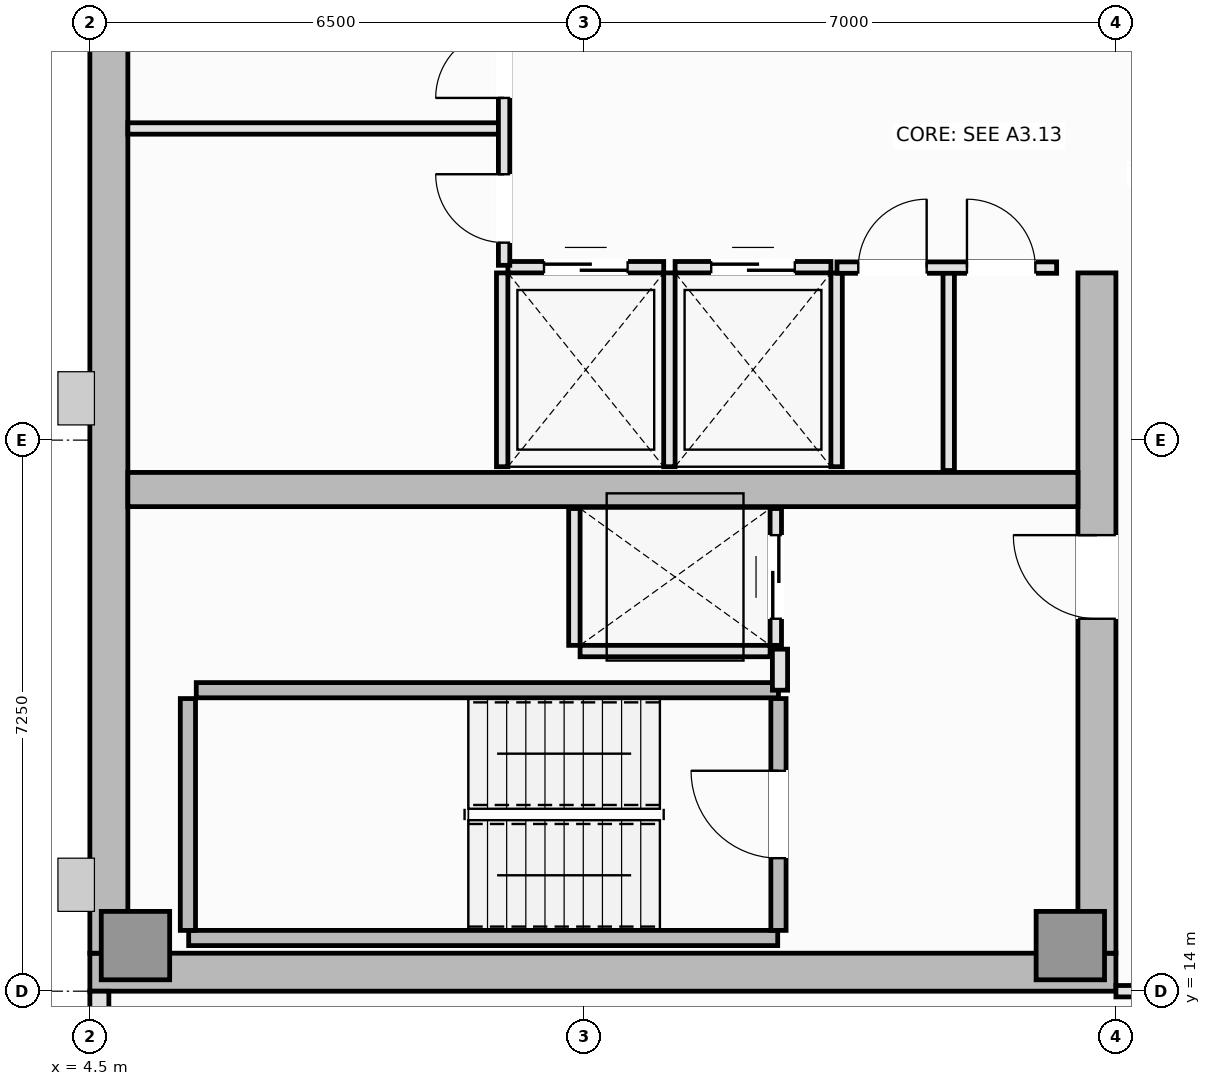
"""IFC4 building model, lengths in metres.
Left out: names, types, materials, properties, quantities, classifications, styles, units other than length and angle.
Written with IfcOpenShell. Run it as: python <this file> out.ifc"""

import sys

from ifc_helpers import new_model, si_unit, direction, frame, frame_2d, origin, origin_2d, place, context, subcontext, project, spatial, rectangle, extrude, element, fill, save


model = new_model("IFC4")
c1 = context("Model", 3, precision=1e-05, world=origin(), true_north=direction((0.0, 1.0)))
c2 = subcontext(c1, "Body", "Model", "MODEL_VIEW")
j1 = project(units=[si_unit("LENGTHUNIT", "METRE"), si_unit("PLANEANGLEUNIT", "RADIAN")], contexts=[c1])
p1 = place(None, origin())
s1 = spatial("IfcSite", under=j1, at=p1, CompositionType="ELEMENT")
p2 = place(p1, origin())
s2 = spatial("IfcBuilding", under=s1, at=p2, CompositionType="ELEMENT")
p3 = place(p2, frame((0.0, 0.0, 249.25)))
s3 = spatial("IfcBuildingStorey", under=s2, at=p3, CompositionType="ELEMENT", Elevation=249.25)
p4 = place(p3, frame((4.5, 14.25, 0.0), z_axis=(0.0, 0.0, 1.0), x_axis=(1.0, 0.0, 0.0)))
e1 = element("IfcWall", 1, at=p4, inside=s3, PredefinedType="SHEAR", context=c2, shape_type="SweptSolid", body=[
    extrude(rectangle(XDim=13.5, YDim=0.5, at=frame_2d((6.75, 0.0))), origin(), (0.0, 0.0, 1.0), 3.55),
])
p5 = place(p3, frame((4.75, 14.5, 0.0), z_axis=(0.0, 0.0, 1.0), x_axis=(0.0, 1.0, 0.0)))
e2 = element("IfcWall", 2, at=p5, inside=s3, PredefinedType="SHEAR", context=c2, shape_type="SweptSolid", body=[
    extrude(rectangle(XDim=21.5, YDim=0.5, at=frame_2d((10.75, 0.0))), origin(), (0.0, 0.0, 1.0), 3.55),
])
p6 = place(p3, frame((17.75, 14.5, 0.0), z_axis=(0.0, 0.0, 1.0), x_axis=(0.0, 1.0, 0.0)))
e3 = element("IfcWall", 3, at=p6, inside=s3, PredefinedType="SHEAR", context=c2, shape_type="SweptSolid", body=[
    extrude(rectangle(XDim=8.95, YDim=0.5, at=frame_2d((4.475, 0.0))), origin(), (0.0, 0.0, 1.0), 3.55),
])
p7 = place(p6, frame((4.4, 0.0, 0.0)))
e4 = element("IfcOpeningElement", 4, at=p7, cuts=e3, PredefinedType="OPENING", context=c2, shape_type="SweptSolid", body=[
    extrude(rectangle(XDim=1.1, YDim=2.15, at=frame_2d((0.55, 1.075))), frame((0.0, 0.26, 0.0), z_axis=(0.0, -1.0, 0.0), x_axis=(1.0, 0.0, 0.0)), (0.0, 0.0, 1.0), 0.52),
])
p8 = place(p3, frame((5.0, 20.6, 0.0), z_axis=(0.0, 0.0, 1.0), x_axis=(1.0, 0.0, 0.0)))
e5 = element("IfcWall", 5, at=p8, inside=s3, PredefinedType="SHEAR", context=c2, shape_type="SweptSolid", body=[
    extrude(rectangle(XDim=12.5, YDim=0.45, at=frame_2d((6.25, 0.0))), origin(), (0.0, 0.0, 1.0), 3.55),
])
for number, where, z_axis, x_axis in (
    (6, (5.1, 14.6, 0.0), (0.0, 0.0, 1.0), (1.0, 0.0, 0.0)),
    (7, (17.4, 14.6, 0.0), (0.0, 0.0, 1.0), (1.0, 0.0, 0.0)),
):
    element("IfcColumn", number, at=place(p3, frame(where, z_axis=z_axis, x_axis=x_axis)), inside=s3, PredefinedType="PILASTER", context=c2, shape_type="SweptSolid", body=[
        extrude(rectangle(XDim=0.9, YDim=0.9, at=origin_2d()), origin(), (0.0, 0.0, 1.0), 3.55),
    ])
p9 = place(p3, frame((4.625, 14.0, 0.0), z_axis=(0.0, 0.0, 1.0), x_axis=(0.0, -1.0, 0.0)))
e8 = element("IfcWall", 8, at=p9, inside=s3, PredefinedType="SOLIDWALL", context=c2, shape_type="SweptSolid", body=[
    extrude(rectangle(XDim=3.4, YDim=0.25, at=frame_2d((1.7, 0.0))), origin(), (0.0, 0.0, 1.0), 3.39),
])
p10 = place(p9, frame((0.6, 0.0, 0.9)))
e9 = element("IfcOpeningElement", 9, at=p10, cuts=e8, PredefinedType="OPENING", context=c2, shape_type="SweptSolid", body=[
    extrude(rectangle(XDim=2.2, YDim=1.8, at=frame_2d((1.1, 0.9))), frame((0.0, 0.135, 0.0), z_axis=(0.0, -1.0, 0.0), x_axis=(1.0, 0.0, 0.0)), (0.0, 0.0, 1.0), 0.27),
])
p11 = place(p3, frame((5.8, 14.7, 0.0), z_axis=(0.0, 0.0, 1.0), x_axis=(1.0, 0.0, 0.0)))
e10 = element("IfcWall", 10, at=p11, inside=s3, PredefinedType="SOLIDWALL", context=c2, shape_type="SweptSolid", body=[
    extrude(rectangle(XDim=7.75, YDim=0.2, at=frame_2d((3.875, 0.0))), origin(), (0.0, 0.0, 1.0), 3.55),
])
p12 = place(p3, frame((5.79, 14.8, 0.0), z_axis=(0.0, 0.0, 1.0), x_axis=(0.0, 1.0, 0.0)))
e11 = element("IfcWall", 11, at=p12, inside=s3, PredefinedType="SOLIDWALL", context=c2, shape_type="SweptSolid", body=[
    extrude(rectangle(XDim=3.05, YDim=0.2, at=frame_2d((1.525, 0.0))), origin(), (0.0, 0.0, 1.0), 3.55),
])
p13 = place(p3, frame((5.9, 17.96, 0.0), z_axis=(0.0, 0.0, 1.0), x_axis=(1.0, 0.0, 0.0)))
e12 = element("IfcWall", 12, at=p13, inside=s3, PredefinedType="SOLIDWALL", context=c2, shape_type="SweptSolid", body=[
    extrude(rectangle(XDim=7.66, YDim=0.2, at=frame_2d((3.83, 0.0))), origin(), (0.0, 0.0, 1.0), 3.55),
])
p14 = place(p3, frame((13.56, 14.8, 0.0), z_axis=(0.0, 0.0, 1.0), x_axis=(0.0, 1.0, 0.0)))
e13 = element("IfcWall", 13, at=p14, inside=s3, PredefinedType="SOLIDWALL", context=c2, shape_type="SweptSolid", body=[
    extrude(rectangle(XDim=3.05, YDim=0.2, at=frame_2d((1.525, 0.0))), origin(), (0.0, 0.0, 1.0), 3.55),
])
p15 = place(p14, frame((0.95, 0.0, 0.0)))
e14 = element("IfcOpeningElement", 14, at=p15, cuts=e13, PredefinedType="OPENING", context=c2, shape_type="SweptSolid", body=[
    extrude(rectangle(XDim=1.15, YDim=2.15, at=frame_2d((0.575, 1.075))), frame((0.0, 0.11, 0.0), z_axis=(0.0, -1.0, 0.0), x_axis=(1.0, 0.0, 0.0)), (0.0, 0.0, 1.0), 0.22),
])
p16 = place(p3, frame((10.0, 23.525, 0.0), z_axis=(0.0, 0.0, 1.0), x_axis=(1.0, 0.0, 0.0)))
e15 = element("IfcWall", 15, at=p16, inside=s3, PredefinedType="PARTITIONING", context=c2, shape_type="SweptSolid", body=[
    extrude(rectangle(XDim=2.05, YDim=0.15, at=frame_2d((1.025, 0.0))), origin(), (0.0, 0.0, 1.0), 3.39),
])
p17 = place(p16, frame((0.475, 0.0, 0.0)))
e16 = element("IfcOpeningElement", 16, at=p17, cuts=e15, PredefinedType="OPENING", context=c2, shape_type="SweptSolid", body=[
    extrude(rectangle(XDim=1.1, YDim=2.2, at=frame_2d((0.55, 1.1))), frame((0.0, 0.085, 0.0), z_axis=(0.0, -1.0, 0.0), x_axis=(1.0, 0.0, 0.0)), (0.0, 0.0, 1.0), 0.17),
])
for number, where, z_axis, x_axis in (
    (17, (9.925, 20.9, 0.0), (0.0, 0.0, 1.0), (0.0, 1.0, 0.0)),
    (18, (12.125, 20.9, 0.0), (0.0, 0.0, 1.0), (0.0, 1.0, 0.0)),
):
    element("IfcWall", number, at=place(p3, frame(where, z_axis=z_axis, x_axis=x_axis)), inside=s3, PredefinedType="PARTITIONING", context=c2, shape_type="SweptSolid", body=[
        extrude(rectangle(XDim=2.55, YDim=0.15, at=frame_2d((1.275, 0.0))), origin(), (0.0, 0.0, 1.0), 3.39),
    ])
p18 = place(p3, frame((12.2, 23.525, 0.0), z_axis=(0.0, 0.0, 1.0), x_axis=(1.0, 0.0, 0.0)))
e19 = element("IfcWall", 19, at=p18, inside=s3, PredefinedType="PARTITIONING", context=c2, shape_type="SweptSolid", body=[
    extrude(rectangle(XDim=2.05, YDim=0.15, at=frame_2d((1.025, 0.0))), origin(), (0.0, 0.0, 1.0), 3.39),
])
p19 = place(p18, frame((0.475, 0.0, 0.0)))
e20 = element("IfcOpeningElement", 20, at=p19, cuts=e19, PredefinedType="OPENING", context=c2, shape_type="SweptSolid", body=[
    extrude(rectangle(XDim=1.1, YDim=2.2, at=frame_2d((0.55, 1.1))), frame((0.0, 0.085, 0.0), z_axis=(0.0, -1.0, 0.0), x_axis=(1.0, 0.0, 0.0)), (0.0, 0.0, 1.0), 0.17),
])
p20 = place(p3, frame((14.325, 20.9, 0.0), z_axis=(0.0, 0.0, 1.0), x_axis=(0.0, 1.0, 0.0)))
e21 = element("IfcWall", 21, at=p20, inside=s3, PredefinedType="PARTITIONING", context=c2, shape_type="SweptSolid", body=[
    extrude(rectangle(XDim=2.55, YDim=0.15, at=frame_2d((1.275, 0.0))), origin(), (0.0, 0.0, 1.0), 3.39),
])
p21 = place(p3, frame((10.95, 18.475, 0.0), z_axis=(0.0, 0.0, 1.0), x_axis=(1.0, 0.0, 0.0)))
e22 = element("IfcWall", 22, at=p21, inside=s3, PredefinedType="PARTITIONING", context=c2, shape_type="SweptSolid", body=[
    extrude(rectangle(XDim=2.5, YDim=0.15, at=frame_2d((1.25, 0.0))), origin(), (0.0, 0.0, 1.0), 3.39),
])
p22 = place(p3, frame((10.875, 18.55, 0.0), z_axis=(0.0, 0.0, 1.0), x_axis=(0.0, 1.0, 0.0)))
e23 = element("IfcWall", 23, at=p22, inside=s3, PredefinedType="PARTITIONING", context=c2, shape_type="SweptSolid", body=[
    extrude(rectangle(XDim=1.8, YDim=0.15, at=frame_2d((0.9, 0.0))), origin(), (0.0, 0.0, 1.0), 3.39),
])
p23 = place(p3, frame((13.525, 18.55, 0.0), z_axis=(0.0, 0.0, 1.0), x_axis=(0.0, 1.0, 0.0)))
e24 = element("IfcWall", 24, at=p23, inside=s3, PredefinedType="PARTITIONING", context=c2, shape_type="SweptSolid", body=[
    extrude(rectangle(XDim=1.8, YDim=0.15, at=frame_2d((0.9, 0.0))), origin(), (0.0, 0.0, 1.0), 3.39),
])
p24 = place(p23, frame((0.35, 0.0, 0.0)))
e25 = element("IfcOpeningElement", 25, at=p24, cuts=e24, PredefinedType="OPENING", context=c2, shape_type="SweptSolid", body=[
    extrude(rectangle(XDim=1.1, YDim=2.2, at=frame_2d((0.55, 1.1))), frame((0.0, 0.085, 0.0), z_axis=(0.0, -1.0, 0.0), x_axis=(1.0, 0.0, 0.0)), (0.0, 0.0, 1.0), 0.17),
])
p25 = place(p3, frame((13.58, 17.96, 0.0), z_axis=(0.0, 0.0, 1.0), x_axis=(0.0, 1.0, 0.0)))
e26 = element("IfcWall", 26, at=p25, inside=s3, PredefinedType="PARTITIONING", context=c2, shape_type="SweptSolid", body=[
    extrude(rectangle(XDim=0.54, YDim=0.2, at=frame_2d((0.27, 0.0))), origin(), (0.0, 0.0, 1.0), 3.39),
])
p26 = place(p3, frame((5.0, 25.35, 0.0), z_axis=(0.0, 0.0, 1.0), x_axis=(1.0, 0.0, 0.0)))
e27 = element("IfcWall", 27, at=p26, inside=s3, PredefinedType="PARTITIONING", context=c2, shape_type="SweptSolid", body=[
    extrude(rectangle(XDim=4.95, YDim=0.15, at=frame_2d((2.475, 0.0))), origin(), (0.0, 0.0, 1.0), 3.39),
])
p27 = place(p3, frame((9.95, 23.55, 0.0), z_axis=(0.0, 0.0, 1.0), x_axis=(0.0, 1.0, 0.0)))
e28 = element("IfcWall", 28, at=p27, inside=s3, PredefinedType="PARTITIONING", context=c2, shape_type="SweptSolid", body=[
    extrude(rectangle(XDim=3.4, YDim=0.15, at=frame_2d((1.7, 0.0))), origin(), (0.0, 0.0, 1.0), 3.39),
])
p28 = place(p27, frame((0.298, 0.0, 0.0)))
e29 = element("IfcOpeningElement", 29, at=p28, cuts=e28, PredefinedType="OPENING", context=c2, shape_type="SweptSolid", body=[
    extrude(rectangle(XDim=0.9, YDim=2.1, at=frame_2d((0.45, 1.05))), frame((0.0, 0.085, 0.0), z_axis=(0.0, -1.0, 0.0), x_axis=(1.0, 0.0, 0.0)), (0.0, 0.0, 1.0), 0.17),
])
p29 = place(p27, frame((2.202, 0.0, 0.0)))
e30 = element("IfcOpeningElement", 30, at=p29, cuts=e28, PredefinedType="OPENING", context=c2, shape_type="SweptSolid", body=[
    extrude(rectangle(XDim=0.9, YDim=2.1, at=frame_2d((0.45, 1.05))), frame((0.0, 0.085, 0.0), z_axis=(0.0, -1.0, 0.0), x_axis=(1.0, 0.0, 0.0)), (0.0, 0.0, 1.0), 0.17),
])
p30 = place(p3, frame((15.8, 20.85, 0.0), z_axis=(0.0, 0.0, 1.0), x_axis=(0.0, 1.0, 0.0)))
e31 = element("IfcWall", 31, at=p30, inside=s3, PredefinedType="PARTITIONING", context=c2, shape_type="SweptSolid", body=[
    extrude(rectangle(XDim=2.67, YDim=0.15, at=frame_2d((1.335, 0.0))), origin(), (0.0, 0.0, 1.0), 3.39),
])
p31 = place(p3, frame((14.33, 23.52, 0.0), z_axis=(0.0, 0.0, 1.0), x_axis=(1.0, 0.0, 0.0)))
e32 = element("IfcWall", 32, at=p31, inside=s3, PredefinedType="PARTITIONING", context=c2, shape_type="SweptSolid", body=[
    extrude(rectangle(XDim=2.89, YDim=0.15, at=frame_2d((1.445, 0.0))), origin(), (0.0, 0.0, 1.0), 3.39),
])
p32 = place(p31, frame((0.28, 0.0, 0.0)))
e33 = element("IfcOpeningElement", 33, at=p32, cuts=e32, PredefinedType="OPENING", context=c2, shape_type="SweptSolid", body=[
    extrude(rectangle(XDim=0.9, YDim=2.1, at=frame_2d((0.45, 1.05))), frame((0.0, 0.085, 0.0), z_axis=(0.0, -1.0, 0.0), x_axis=(1.0, 0.0, 0.0)), (0.0, 0.0, 1.0), 0.17),
])
p33 = place(p31, frame((1.71, 0.0, 0.0)))
e34 = element("IfcOpeningElement", 34, at=p33, cuts=e32, PredefinedType="OPENING", context=c2, shape_type="SweptSolid", body=[
    extrude(rectangle(XDim=0.9, YDim=2.1, at=frame_2d((0.45, 1.05))), frame((0.0, 0.085, 0.0), z_axis=(0.0, -1.0, 0.0), x_axis=(1.0, 0.0, 0.0)), (0.0, 0.0, 1.0), 0.17),
])
p34 = place(p3, frame((18.0, 14.0, 0.0), z_axis=(0.0, 0.0, 1.0), x_axis=(1.0, 0.0, 0.0)))
e35 = element("IfcWall", 35, at=p34, inside=s3, PredefinedType="PARTITIONING", context=c2, shape_type="SweptSolid", body=[
    extrude(rectangle(XDim=1.9, YDim=0.15, at=frame_2d((0.95, 0.0))), origin(), (0.0, 0.0, 1.0), 3.39),
])
p35 = place(p34, frame((0.5, 0.0, 0.0)))
e36 = element("IfcOpeningElement", 36, at=p35, cuts=e35, PredefinedType="OPENING", context=c2, shape_type="SweptSolid", body=[
    extrude(rectangle(XDim=0.9, YDim=2.1, at=frame_2d((0.45, 1.05))), frame((0.0, 0.085, 0.0), z_axis=(0.0, -1.0, 0.0), x_axis=(1.0, 0.0, 0.0)), (0.0, 0.0, 1.0), 0.17),
])
p36 = place(p15, origin())
e37 = element("IfcDoor", 37, at=p36, inside=s3, OperationType="SINGLE_SWING_RIGHT", PredefinedType="DOOR", context=c2, shape_type="SweptSolid", body=[
    extrude(rectangle(XDim=1.15, YDim=2.15, at=frame_2d((0.575, 1.075))), frame((0.0, 0.025, 0.0), z_axis=(0.0, -1.0, 0.0), x_axis=(1.0, 0.0, 0.0)), (0.0, 0.0, 1.0), 0.05),
])
fill(e14, e37)
p37 = place(p17, origin())
e38 = element("IfcDoor", 38, at=p37, inside=s3, OperationType="DOUBLE_DOOR_SLIDING", PredefinedType="DOOR", context=c2, shape_type="SweptSolid", body=[
    extrude(rectangle(XDim=1.1, YDim=2.2, at=frame_2d((0.55, 1.1))), frame((0.0, 0.025, 0.0), z_axis=(0.0, -1.0, 0.0), x_axis=(1.0, 0.0, 0.0)), (0.0, 0.0, 1.0), 0.05),
])
fill(e16, e38)
p38 = place(p19, origin())
e39 = element("IfcDoor", 39, at=p38, inside=s3, OperationType="DOUBLE_DOOR_SLIDING", PredefinedType="DOOR", context=c2, shape_type="SweptSolid", body=[
    extrude(rectangle(XDim=1.1, YDim=2.2, at=frame_2d((0.55, 1.1))), frame((0.0, 0.025, 0.0), z_axis=(0.0, -1.0, 0.0), x_axis=(1.0, 0.0, 0.0)), (0.0, 0.0, 1.0), 0.05),
])
fill(e20, e39)
p39 = place(p24, origin())
e40 = element("IfcDoor", 40, at=p39, inside=s3, OperationType="DOUBLE_DOOR_SLIDING", PredefinedType="DOOR", context=c2, shape_type="SweptSolid", body=[
    extrude(rectangle(XDim=1.1, YDim=2.2, at=frame_2d((0.55, 1.1))), frame((0.0, 0.025, 0.0), z_axis=(0.0, -1.0, 0.0), x_axis=(1.0, 0.0, 0.0)), (0.0, 0.0, 1.0), 0.05),
])
fill(e25, e40)
p40 = place(p7, origin())
e41 = element("IfcDoor", 41, at=p40, inside=s3, OperationType="SINGLE_SWING_RIGHT", PredefinedType="DOOR", context=c2, shape_type="SweptSolid", body=[
    extrude(rectangle(XDim=1.1, YDim=2.15, at=frame_2d((0.55, 1.075))), frame((0.0, 0.025, 0.0), z_axis=(0.0, -1.0, 0.0), x_axis=(1.0, 0.0, 0.0)), (0.0, 0.0, 1.0), 0.05),
])
fill(e4, e41)
p41 = place(p28, origin())
e42 = element("IfcDoor", 42, at=p41, inside=s3, OperationType="SINGLE_SWING_RIGHT", PredefinedType="DOOR", context=c2, shape_type="SweptSolid", body=[
    extrude(rectangle(XDim=0.9, YDim=2.1, at=frame_2d((0.45, 1.05))), frame((0.0, 0.025, 0.0), z_axis=(0.0, -1.0, 0.0), x_axis=(1.0, 0.0, 0.0)), (0.0, 0.0, 1.0), 0.05),
])
fill(e29, e42)
p42 = place(p29, origin())
e43 = element("IfcDoor", 43, at=p42, inside=s3, OperationType="SINGLE_SWING_LEFT", PredefinedType="DOOR", context=c2, shape_type="SweptSolid", body=[
    extrude(rectangle(XDim=0.9, YDim=2.1, at=frame_2d((0.45, 1.05))), frame((0.0, 0.025, 0.0), z_axis=(0.0, -1.0, 0.0), x_axis=(1.0, 0.0, 0.0)), (0.0, 0.0, 1.0), 0.05),
])
fill(e30, e43)
p43 = place(p32, origin())
e44 = element("IfcDoor", 44, at=p43, inside=s3, OperationType="SINGLE_SWING_RIGHT", PredefinedType="DOOR", context=c2, shape_type="SweptSolid", body=[
    extrude(rectangle(XDim=0.9, YDim=2.1, at=frame_2d((0.45, 1.05))), frame((0.0, 0.025, 0.0), z_axis=(0.0, -1.0, 0.0), x_axis=(1.0, 0.0, 0.0)), (0.0, 0.0, 1.0), 0.05),
])
fill(e33, e44)
p44 = place(p33, origin())
e45 = element("IfcDoor", 45, at=p44, inside=s3, OperationType="SINGLE_SWING_LEFT", PredefinedType="DOOR", context=c2, shape_type="SweptSolid", body=[
    extrude(rectangle(XDim=0.9, YDim=2.1, at=frame_2d((0.45, 1.05))), frame((0.0, 0.025, 0.0), z_axis=(0.0, -1.0, 0.0), x_axis=(1.0, 0.0, 0.0)), (0.0, 0.0, 1.0), 0.05),
])
fill(e34, e45)
save(model, sys.argv[1])
